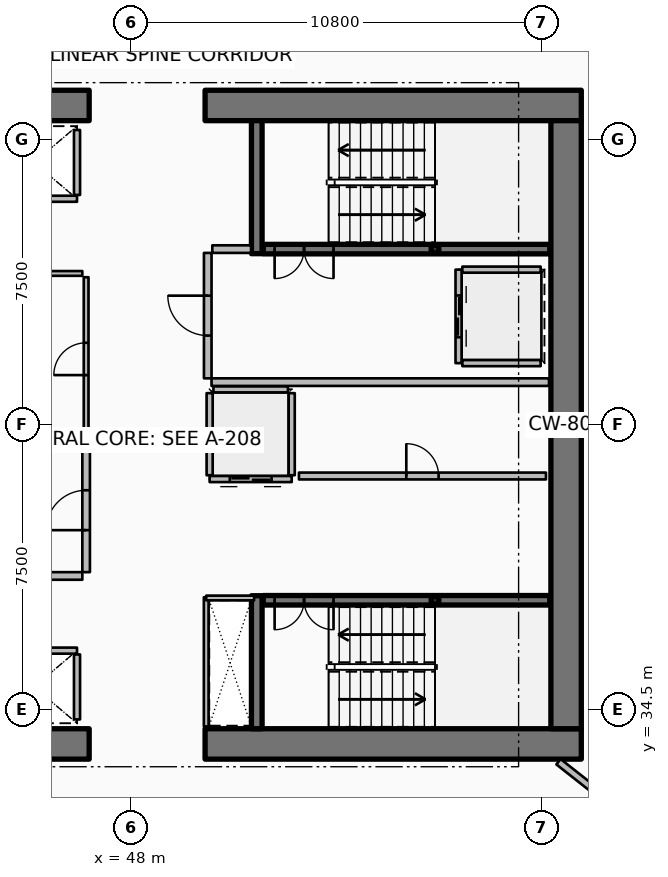
"""IFC4 building model, lengths in metres.
Left out: names, types, materials, properties, quantities, classifications, styles, units other than length and angle.
Written with IfcOpenShell. Run it as: python <this file> out.ifc"""

import sys

from ifc_helpers import new_model, si_unit, direction, frame, frame_2d, origin, origin_2d, place, context, subcontext, project, spatial, rectangle, hollow_rectangle, extrude, element, fill, save


model = new_model("IFC4")
c1 = context("Model", 3, precision=1e-05, world=origin(), true_north=direction((0.0, 1.0)))
c2 = subcontext(c1, "Body", "Model", "MODEL_VIEW")
j1 = project(units=[si_unit("LENGTHUNIT", "METRE"), si_unit("PLANEANGLEUNIT", "RADIAN")], contexts=[c1])
p1 = place(None, origin())
s1 = spatial("IfcSite", under=j1, at=p1, CompositionType="ELEMENT")
p2 = place(p1, origin())
s2 = spatial("IfcBuilding", under=s1, at=p2, CompositionType="ELEMENT")
p3 = place(p2, frame((0.0, 0.0, 139.05)))
s3 = spatial("IfcBuildingStorey", under=s2, at=p3, CompositionType="ELEMENT", Elevation=139.05)
p4 = place(p3, frame((37.0, 33.6, 0.0), z_axis=(0.0, 0.0, 1.0), x_axis=(1.0, 0.0, 0.0)))
e1 = element("IfcWall", 1, at=p4, inside=s3, PredefinedType="SHEAR", context=c2, shape_type="SweptSolid", body=[
    extrude(rectangle(XDim=9.9, YDim=0.8, at=frame_2d((4.95, 0.0))), origin(), (0.0, 0.0, 1.0), 3.75),
])
p5 = place(p3, frame((49.95, 33.6, 0.0), z_axis=(0.0, 0.0, 1.0), x_axis=(1.0, 0.0, 0.0)))
e2 = element("IfcWall", 2, at=p5, inside=s3, PredefinedType="SHEAR", context=c2, shape_type="SweptSolid", body=[
    extrude(rectangle(XDim=9.9, YDim=0.8, at=frame_2d((4.95, 0.0))), origin(), (0.0, 0.0, 1.0), 3.75),
])
p6 = place(p3, frame((37.0, 50.4, 0.0), z_axis=(0.0, 0.0, 1.0), x_axis=(1.0, 0.0, 0.0)))
e3 = element("IfcWall", 3, at=p6, inside=s3, PredefinedType="SHEAR", context=c2, shape_type="SweptSolid", body=[
    extrude(rectangle(XDim=9.9, YDim=0.8, at=frame_2d((4.95, 0.0))), origin(), (0.0, 0.0, 1.0), 3.75),
])
p7 = place(p3, frame((49.95, 50.4, 0.0), z_axis=(0.0, 0.0, 1.0), x_axis=(1.0, 0.0, 0.0)))
e4 = element("IfcWall", 4, at=p7, inside=s3, PredefinedType="SHEAR", context=c2, shape_type="SweptSolid", body=[
    extrude(rectangle(XDim=9.9, YDim=0.8, at=frame_2d((4.95, 0.0))), origin(), (0.0, 0.0, 1.0), 3.75),
])
p8 = place(p3, frame((59.45, 34.0, 0.0), z_axis=(0.0, 0.0, 1.0), x_axis=(0.0, 1.0, 0.0)))
e5 = element("IfcWall", 5, at=p8, inside=s3, PredefinedType="SHEAR", context=c2, shape_type="SweptSolid", body=[
    extrude(rectangle(XDim=16.0, YDim=0.8, at=frame_2d((8.0, 0.0))), origin(), (0.0, 0.0, 1.0), 3.75),
])
for number, where, z_axis, x_axis in (
    (6, (51.31, 46.5, 0.0), (0.0, 0.0, 1.0), (0.0, 1.0, 0.0)),
    (7, (51.31, 34.0, 0.0), (0.0, 0.0, 1.0), (0.0, 1.0, 0.0)),
):
    element("IfcWall", number, at=place(p3, frame(where, z_axis=z_axis, x_axis=x_axis)), inside=s3, PredefinedType="SHEAR", context=c2, shape_type="SweptSolid", body=[
        extrude(rectangle(XDim=3.5, YDim=0.28, at=frame_2d((1.75, 0.0))), origin(), (0.0, 0.0, 1.0), 3.75),
    ])
for number, where, z_axis, x_axis in (
    (8, (56.0, 46.62, 0.0), (0.0, 0.0, 1.0), (1.0, 0.0, 0.0)),
    (9, (56.0, 37.38, 0.0), (0.0, 0.0, 1.0), (1.0, 0.0, 0.0)),
):
    element("IfcColumn", number, at=place(p3, frame(where, z_axis=z_axis, x_axis=x_axis)), inside=s3, PredefinedType="COLUMN", context=c2, shape_type="SweptSolid", body=[
        extrude(hollow_rectangle(XDim=0.2, YDim=0.2, WallThickness=0.01, InnerFilletRadius=0.01, OuterFilletRadius=0.02, at=origin_2d()), origin(), (0.0, 0.0, 1.0), 1.67),
    ])
p9 = place(p3, frame((51.48, 46.62, 0.0), z_axis=(0.0, 0.0, 1.0), x_axis=(1.0, 0.0, 0.0)))
e10 = element("IfcWall", 10, at=p9, inside=s3, PredefinedType="SOLIDWALL", context=c2, shape_type="SweptSolid", body=[
    extrude(rectangle(XDim=7.54, YDim=0.25, at=frame_2d((3.77, 0.0))), origin(), (0.0, 0.0, 1.0), 3.5),
])
p10 = place(p9, frame((0.3, 0.0, 0.0)))
e11 = element("IfcOpeningElement", 11, at=p10, cuts=e10, PredefinedType="OPENING", context=c2, shape_type="SweptSolid", body=[
    extrude(rectangle(XDim=1.55, YDim=2.15, at=frame_2d((0.775, 1.075))), frame((0.0, 0.135, 0.0), z_axis=(0.0, -1.0, 0.0), x_axis=(1.0, 0.0, 0.0)), (0.0, 0.0, 1.0), 0.27),
])
p11 = place(p3, frame((51.48, 37.38, 0.0), z_axis=(0.0, 0.0, 1.0), x_axis=(1.0, 0.0, 0.0)))
e12 = element("IfcWall", 12, at=p11, inside=s3, PredefinedType="SOLIDWALL", context=c2, shape_type="SweptSolid", body=[
    extrude(rectangle(XDim=7.54, YDim=0.25, at=frame_2d((3.77, 0.0))), origin(), (0.0, 0.0, 1.0), 3.5),
])
p12 = place(p11, frame((0.3, 0.0, 0.0)))
e13 = element("IfcOpeningElement", 13, at=p12, cuts=e12, PredefinedType="OPENING", context=c2, shape_type="SweptSolid", body=[
    extrude(rectangle(XDim=1.55, YDim=2.15, at=frame_2d((0.775, 1.075))), frame((0.0, 0.135, 0.0), z_axis=(0.0, -1.0, 0.0), x_axis=(1.0, 0.0, 0.0)), (0.0, 0.0, 1.0), 0.27),
])
p13 = place(p3, frame((46.58, 47.945, 0.0), z_axis=(0.0, 0.0, 1.0), x_axis=(-1.0, 0.0, 0.0)))
e14 = element("IfcWall", 14, at=p13, inside=s3, PredefinedType="PARTITIONING", context=c2, shape_type="SweptSolid", body=[
    extrude(rectangle(XDim=2.26, YDim=0.16, at=frame_2d((1.13, 0.0))), origin(), (0.0, 0.0, 1.0), 3.5),
])
p14 = place(p3, frame((46.58, 48.045, 0.0), z_axis=(0.0, 0.0, 1.0), x_axis=(0.0, 1.0, 0.0)))
e15 = element("IfcWall", 15, at=p14, inside=s3, PredefinedType="PARTITIONING", context=c2, shape_type="SweptSolid", body=[
    extrude(rectangle(XDim=1.71, YDim=0.16, at=frame_2d((0.855, 0.0))), origin(), (0.0, 0.0, 1.0), 3.5),
])
p15 = place(p3, frame((44.32, 36.055, 0.0), z_axis=(0.0, 0.0, 1.0), x_axis=(1.0, 0.0, 0.0)))
e16 = element("IfcWall", 16, at=p15, inside=s3, PredefinedType="PARTITIONING", context=c2, shape_type="SweptSolid", body=[
    extrude(rectangle(XDim=2.26, YDim=0.16, at=frame_2d((1.13, 0.0))), origin(), (0.0, 0.0, 1.0), 3.5),
])
p16 = place(p3, frame((46.58, 34.245, 0.0), z_axis=(0.0, 0.0, 1.0), x_axis=(0.0, 1.0, 0.0)))
e17 = element("IfcWall", 17, at=p16, inside=s3, PredefinedType="PARTITIONING", context=c2, shape_type="SweptSolid", body=[
    extrude(rectangle(XDim=1.71, YDim=0.16, at=frame_2d((0.855, 0.0))), origin(), (0.0, 0.0, 1.0), 3.5),
])
p17 = place(p3, frame((56.62, 46.08, 0.0), z_axis=(0.0, 0.0, 1.0), x_axis=(0.0, -1.0, 0.0)))
e18 = element("IfcWall", 18, at=p17, inside=s3, PredefinedType="PARTITIONING", context=c2, shape_type="SweptSolid", body=[
    extrude(rectangle(XDim=2.46, YDim=0.16, at=frame_2d((1.23, 0.0))), origin(), (0.0, 0.0, 1.0), 3.5),
])
p18 = place(p17, frame((0.68, 0.0, 0.0)))
e19 = element("IfcOpeningElement", 19, at=p18, cuts=e18, PredefinedType="OPENING", context=c2, shape_type="SweptSolid", body=[
    extrude(rectangle(XDim=1.1, YDim=2.1, at=frame_2d((0.55, 1.05))), frame((0.0, 0.09, 0.0), z_axis=(0.0, -1.0, 0.0), x_axis=(1.0, 0.0, 0.0)), (0.0, 0.0, 1.0), 0.18),
])
for number, where, z_axis, x_axis in (
    (20, (56.72, 46.08, 0.0), (0.0, 0.0, 1.0), (1.0, 0.0, 0.0)),
    (21, (56.72, 43.62, 0.0), (0.0, 0.0, 1.0), (1.0, 0.0, 0.0)),
):
    element("IfcWall", number, at=place(p3, frame(where, z_axis=z_axis, x_axis=x_axis)), inside=s3, PredefinedType="PARTITIONING", context=c2, shape_type="SweptSolid", body=[
        extrude(rectangle(XDim=2.06, YDim=0.16, at=frame_2d((1.03, 0.0))), origin(), (0.0, 0.0, 1.0), 3.5),
    ])
p19 = place(p3, frame((52.23, 40.57, 0.0), z_axis=(0.0, 0.0, 1.0), x_axis=(-1.0, 0.0, 0.0)))
e22 = element("IfcWall", 22, at=p19, inside=s3, PredefinedType="PARTITIONING", context=c2, shape_type="SweptSolid", body=[
    extrude(rectangle(XDim=2.16, YDim=0.16, at=frame_2d((1.08, 0.0))), origin(), (0.0, 0.0, 1.0), 3.5),
])
p20 = place(p19, frame((0.53, 0.0, 0.0)))
e23 = element("IfcOpeningElement", 23, at=p20, cuts=e22, PredefinedType="OPENING", context=c2, shape_type="SweptSolid", body=[
    extrude(rectangle(XDim=1.1, YDim=2.1, at=frame_2d((0.55, 1.05))), frame((0.0, 0.09, 0.0), z_axis=(0.0, -1.0, 0.0), x_axis=(1.0, 0.0, 0.0)), (0.0, 0.0, 1.0), 0.18),
])
for number, where, z_axis, x_axis in (
    (24, (52.23, 40.67, 0.0), (0.0, 0.0, 1.0), (0.0, 1.0, 0.0)),
    (25, (50.07, 40.67, 0.0), (0.0, 0.0, 1.0), (0.0, 1.0, 0.0)),
):
    element("IfcWall", number, at=place(p3, frame(where, z_axis=z_axis, x_axis=x_axis)), inside=s3, PredefinedType="PARTITIONING", context=c2, shape_type="SweptSolid", body=[
        extrude(rectangle(XDim=2.16, YDim=0.16, at=frame_2d((1.08, 0.0))), origin(), (0.0, 0.0, 1.0), 3.5),
    ])
p21 = place(p3, frame((50.17, 42.93, 0.0), z_axis=(0.0, 0.0, 1.0), x_axis=(1.0, 0.0, 0.0)))
e26 = element("IfcWall", 26, at=p21, inside=s3, PredefinedType="PARTITIONING", context=c2, shape_type="SweptSolid", body=[
    extrude(rectangle(XDim=1.96, YDim=0.16, at=frame_2d((0.98, 0.0))), origin(), (0.0, 0.0, 1.0), 3.5),
])
p22 = place(p3, frame((52.42, 40.65, 0.0), z_axis=(0.0, 0.0, 1.0), x_axis=(1.0, 0.0, 0.0)))
e27 = element("IfcWall", 27, at=p22, inside=s3, PredefinedType="PARTITIONING", context=c2, shape_type="SweptSolid", body=[
    extrude(rectangle(XDim=6.5, YDim=0.18, at=frame_2d((3.25, 0.0))), origin(), (0.0, 0.0, 1.0), 3.5),
])
p23 = place(p22, frame((2.825, 0.0, 0.0)))
e28 = element("IfcOpeningElement", 28, at=p23, cuts=e27, PredefinedType="OPENING", context=c2, shape_type="SweptSolid", body=[
    extrude(rectangle(XDim=0.85, YDim=2.06, at=frame_2d((0.425, 1.03))), frame((0.0, 0.1, 0.0), z_axis=(0.0, -1.0, 0.0), x_axis=(1.0, 0.0, 0.0)), (0.0, 0.0, 1.0), 0.2),
])
p24 = place(p3, frame((41.35, 38.02, 0.0), z_axis=(0.0, 0.0, 1.0), x_axis=(1.0, 0.0, 0.0)))
e29 = element("IfcWall", 29, at=p24, inside=s3, PredefinedType="PARTITIONING", context=c2, shape_type="SweptSolid", body=[
    extrude(rectangle(XDim=5.37, YDim=0.2, at=frame_2d((2.685, 0.0))), origin(), (0.0, 0.0, 1.0), 3.5),
])
p25 = place(p3, frame((43.92, 41.48, 0.0), z_axis=(0.0, 0.0, 1.0), x_axis=(1.0, 0.0, 0.0)))
e30 = element("IfcWall", 30, at=p25, inside=s3, PredefinedType="PARTITIONING", context=c2, shape_type="SweptSolid", body=[
    extrude(rectangle(XDim=2.8, YDim=0.2, at=frame_2d((1.4, 0.0))), origin(), (0.0, 0.0, 1.0), 3.5),
])
p26 = place(p3, frame((46.82, 38.12, 0.0), z_axis=(0.0, 0.0, 1.0), x_axis=(0.0, 1.0, 0.0)))
e31 = element("IfcWall", 31, at=p26, inside=s3, PredefinedType="PARTITIONING", context=c2, shape_type="SweptSolid", body=[
    extrude(rectangle(XDim=3.26, YDim=0.2, at=frame_2d((1.63, 0.0))), origin(), (0.0, 0.0, 1.0), 3.5),
])
p27 = place(p26, frame((1.105, 0.0, 0.0)))
e32 = element("IfcOpeningElement", 32, at=p27, cuts=e31, PredefinedType="OPENING", context=c2, shape_type="SweptSolid", body=[
    extrude(rectangle(XDim=1.05, YDim=2.1, at=frame_2d((0.525, 1.05))), frame((0.0, 0.11, 0.0), z_axis=(0.0, -1.0, 0.0), x_axis=(1.0, 0.0, 0.0)), (0.0, 0.0, 1.0), 0.22),
])
p28 = place(p3, frame((50.12, 43.12, 0.0), z_axis=(0.0, 0.0, 1.0), x_axis=(1.0, 0.0, 0.0)))
e33 = element("IfcWall", 33, at=p28, inside=s3, PredefinedType="PARTITIONING", context=c2, shape_type="SweptSolid", body=[
    extrude(rectangle(XDim=8.88, YDim=0.2, at=frame_2d((4.44, 0.0))), origin(), (0.0, 0.0, 1.0), 3.5),
])
p29 = place(p3, frame((50.14, 46.62, 0.0), z_axis=(0.0, 0.0, 1.0), x_axis=(1.0, 0.0, 0.0)))
e34 = element("IfcWall", 34, at=p29, inside=s3, PredefinedType="PARTITIONING", context=c2, shape_type="SweptSolid", body=[
    extrude(rectangle(XDim=1.02, YDim=0.2, at=frame_2d((0.51, 0.0))), origin(), (0.0, 0.0, 1.0), 3.5),
])
p30 = place(p3, frame((50.02, 43.22, 0.0), z_axis=(0.0, 0.0, 1.0), x_axis=(0.0, 1.0, 0.0)))
e35 = element("IfcWall", 35, at=p30, inside=s3, PredefinedType="PARTITIONING", context=c2, shape_type="SweptSolid", body=[
    extrude(rectangle(XDim=3.3, YDim=0.2, at=frame_2d((1.65, 0.0))), origin(), (0.0, 0.0, 1.0), 3.5),
])
p31 = place(p30, frame((1.125, 0.0, 0.0)))
e36 = element("IfcOpeningElement", 36, at=p31, cuts=e35, PredefinedType="OPENING", context=c2, shape_type="SweptSolid", body=[
    extrude(rectangle(XDim=1.05, YDim=2.1, at=frame_2d((0.525, 1.05))), frame((0.0, 0.11, 0.0), z_axis=(0.0, -1.0, 0.0), x_axis=(1.0, 0.0, 0.0)), (0.0, 0.0, 1.0), 0.22),
])
p32 = place(p3, frame((41.36, 45.98, 0.0), z_axis=(0.0, 0.0, 1.0), x_axis=(1.0, 0.0, 0.0)))
e37 = element("IfcWall", 37, at=p32, inside=s3, PredefinedType="PARTITIONING", context=c2, shape_type="SweptSolid", body=[
    extrude(rectangle(XDim=5.36, YDim=0.125, at=frame_2d((2.68, 0.0))), origin(), (0.0, 0.0, 1.0), 2.94),
])
p33 = place(p3, frame((49.98, 34.06, 0.0), z_axis=(0.0, 0.0, 1.0), x_axis=(0.0, 1.0, 0.0)))
e38 = element("IfcWall", 38, at=p33, inside=s3, PredefinedType="PARTITIONING", context=c2, shape_type="SweptSolid", body=[
    extrude(rectangle(XDim=3.4, YDim=0.125, at=frame_2d((1.7, 0.0))), origin(), (0.0, 0.0, 1.0), 2.94),
])
p34 = place(p3, frame((49.98, 37.44, 0.0), z_axis=(0.0, 0.0, 1.0), x_axis=(1.0, 0.0, 0.0)))
e39 = element("IfcWall", 39, at=p34, inside=s3, PredefinedType="PARTITIONING", context=c2, shape_type="SweptSolid", body=[
    extrude(rectangle(XDim=1.26, YDim=0.125, at=frame_2d((0.63, 0.0))), origin(), (0.0, 0.0, 1.0), 2.94),
])
p35 = place(p3, frame((46.82, 41.58, 0.0), z_axis=(0.0, 0.0, 1.0), x_axis=(0.0, 1.0, 0.0)))
e40 = element("IfcWall", 40, at=p35, inside=s3, PredefinedType="PARTITIONING", context=c2, shape_type="SweptSolid", body=[
    extrude(rectangle(XDim=4.3, YDim=0.125, at=frame_2d((2.15, 0.0))), origin(), (0.0, 0.0, 1.0), 2.94),
])
p36 = place(p35, frame((1.725, 0.0, 0.0)))
e41 = element("IfcOpeningElement", 41, at=p36, cuts=e40, PredefinedType="OPENING", context=c2, shape_type="SweptSolid", body=[
    extrude(rectangle(XDim=0.85, YDim=2.06, at=frame_2d((0.425, 1.03))), frame((0.0, 0.073, 0.0), z_axis=(0.0, -1.0, 0.0), x_axis=(1.0, 0.0, 0.0)), (0.0, 0.0, 1.0), 0.145),
])
p37 = place(p3, frame((59.249, 33.132, 0.0), z_axis=(0.0, 0.0, 1.0), x_axis=(0.785334414621, -0.619071770647, 0.0)))
e42 = element("IfcWall", 42, at=p37, inside=s3, PredefinedType="PARTITIONING", context=c2, shape_type="SweptSolid", body=[
    extrude(rectangle(XDim=9.515, YDim=0.18, at=frame_2d((4.758, 0.0))), origin(), (0.0, 0.0, 1.0), 2.94),
])
p38 = place(p10, origin())
e43 = element("IfcDoor", 43, at=p38, inside=s3, OperationType="DOUBLE_DOOR_SINGLE_SWING", PredefinedType="DOOR", context=c2, shape_type="SweptSolid", body=[
    extrude(rectangle(XDim=1.55, YDim=2.15, at=frame_2d((0.775, 1.075))), frame((0.0, 0.025, 0.0), z_axis=(0.0, -1.0, 0.0), x_axis=(1.0, 0.0, 0.0)), (0.0, 0.0, 1.0), 0.05),
])
fill(e11, e43)
p39 = place(p12, origin())
e44 = element("IfcDoor", 44, at=p39, inside=s3, OperationType="DOUBLE_DOOR_SINGLE_SWING", PredefinedType="DOOR", context=c2, shape_type="SweptSolid", body=[
    extrude(rectangle(XDim=1.55, YDim=2.15, at=frame_2d((0.775, 1.075))), frame((0.0, 0.025, 0.0), z_axis=(0.0, -1.0, 0.0), x_axis=(1.0, 0.0, 0.0)), (0.0, 0.0, 1.0), 0.05),
])
fill(e13, e44)
p40 = place(p18, origin())
e45 = element("IfcDoor", 45, at=p40, inside=s3, OperationType="DOUBLE_DOOR_SLIDING", PredefinedType="DOOR", context=c2, shape_type="SweptSolid", body=[
    extrude(rectangle(XDim=1.1, YDim=2.1, at=frame_2d((0.55, 1.05))), frame((0.0, 0.025, 0.0), z_axis=(0.0, -1.0, 0.0), x_axis=(1.0, 0.0, 0.0)), (0.0, 0.0, 1.0), 0.05),
])
fill(e19, e45)
p41 = place(p20, origin())
e46 = element("IfcDoor", 46, at=p41, inside=s3, OperationType="DOUBLE_DOOR_SLIDING", PredefinedType="DOOR", context=c2, shape_type="SweptSolid", body=[
    extrude(rectangle(XDim=1.1, YDim=2.1, at=frame_2d((0.55, 1.05))), frame((0.0, 0.025, 0.0), z_axis=(0.0, -1.0, 0.0), x_axis=(1.0, 0.0, 0.0)), (0.0, 0.0, 1.0), 0.05),
])
fill(e23, e46)
p42 = place(p23, origin())
e47 = element("IfcDoor", 47, at=p42, inside=s3, OperationType="SINGLE_SWING_LEFT", PredefinedType="DOOR", context=c2, shape_type="SweptSolid", body=[
    extrude(rectangle(XDim=0.85, YDim=2.06, at=frame_2d((0.425, 1.03))), frame((0.0, 0.025, 0.0), z_axis=(0.0, -1.0, 0.0), x_axis=(1.0, 0.0, 0.0)), (0.0, 0.0, 1.0), 0.05),
])
fill(e28, e47)
p43 = place(p27, origin())
e48 = element("IfcDoor", 48, at=p43, inside=s3, OperationType="SINGLE_SWING_LEFT", PredefinedType="DOOR", context=c2, shape_type="SweptSolid", body=[
    extrude(rectangle(XDim=1.05, YDim=2.1, at=frame_2d((0.525, 1.05))), frame((0.0, 0.025, 0.0), z_axis=(0.0, -1.0, 0.0), x_axis=(1.0, 0.0, 0.0)), (0.0, 0.0, 1.0), 0.05),
])
fill(e32, e48)
p44 = place(p31, origin())
e49 = element("IfcDoor", 49, at=p44, inside=s3, OperationType="SINGLE_SWING_RIGHT", PredefinedType="DOOR", context=c2, shape_type="SweptSolid", body=[
    extrude(rectangle(XDim=1.05, YDim=2.1, at=frame_2d((0.525, 1.05))), frame((0.0, 0.025, 0.0), z_axis=(0.0, -1.0, 0.0), x_axis=(1.0, 0.0, 0.0)), (0.0, 0.0, 1.0), 0.05),
])
fill(e36, e49)
p45 = place(p36, origin())
e50 = element("IfcDoor", 50, at=p45, inside=s3, OperationType="SINGLE_SWING_LEFT", PredefinedType="DOOR", context=c2, shape_type="SweptSolid", body=[
    extrude(rectangle(XDim=0.85, YDim=2.06, at=frame_2d((0.425, 1.03))), frame((0.0, 0.025, 0.0), z_axis=(0.0, -1.0, 0.0), x_axis=(1.0, 0.0, 0.0)), (0.0, 0.0, 1.0), 0.05),
])
fill(e41, e50)
save(model, sys.argv[1])
